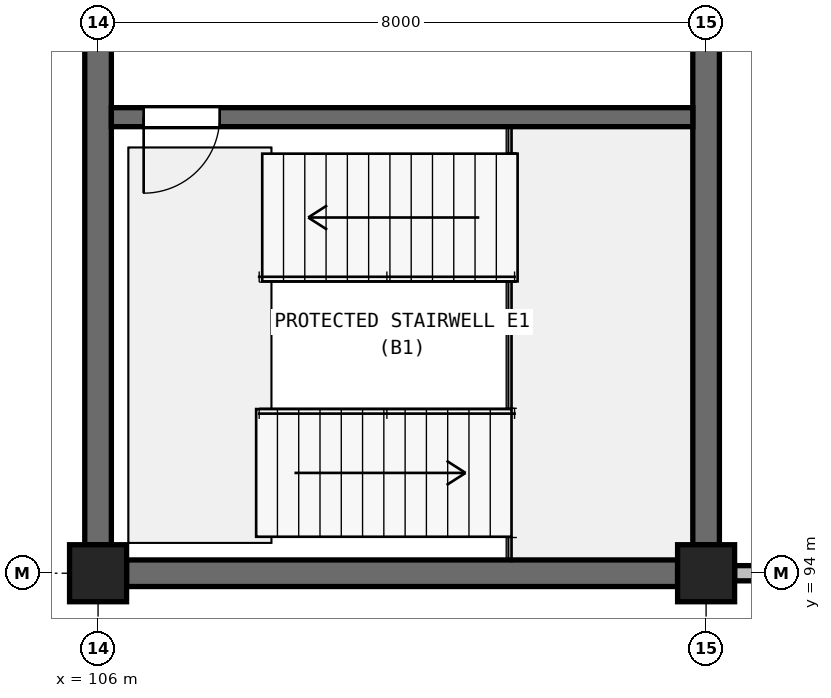
"""IFC4 building model, lengths in metres.
Left out: names, types, materials, properties, quantities, classifications, styles, units other than length and angle.
Written with IfcOpenShell. Run it as: python <this file> out.ifc"""

import sys

from ifc_helpers import new_model, si_unit, direction, frame, frame_2d, origin, origin_2d, place, context, subcontext, project, spatial, rectangle, extrude, element, fill, save


model = new_model("IFC4")
c1 = context("Model", 3, precision=1e-05, world=origin(), true_north=direction((0.0, 1.0)))
c2 = subcontext(c1, "Body", "Model", "MODEL_VIEW")
j1 = project(units=[si_unit("LENGTHUNIT", "METRE"), si_unit("PLANEANGLEUNIT", "RADIAN")], contexts=[c1])
p1 = place(None, origin())
s1 = spatial("IfcSite", under=j1, at=p1, CompositionType="ELEMENT")
p2 = place(p1, origin())
s2 = spatial("IfcBuilding", under=s1, at=p2, CompositionType="ELEMENT")
p3 = place(p2, frame((0.0, 0.0, -4.2)))
s3 = spatial("IfcBuildingStorey", under=s2, at=p3, CompositionType="ELEMENT", Elevation=-4.2)
for number, where, z_axis, x_axis in (
    (1, (106.0, 94.0, 0.0), (0.0, 0.0, 1.0), (1.0, 0.0, 0.0)),
    (2, (114.0, 94.0, 0.0), (0.0, 0.0, 1.0), (1.0, 0.0, 0.0)),
):
    element("IfcColumn", number, at=place(p3, frame(where, z_axis=z_axis, x_axis=x_axis)), inside=s3, PredefinedType="COLUMN", context=c2, shape_type="SweptSolid", body=[
        extrude(rectangle(XDim=0.75, YDim=0.75, at=origin_2d()), origin(), (0.0, 0.0, 1.0), 4.2),
    ])
p4 = place(p3, frame((98.394, 93.606, 0.0), z_axis=(0.0, 0.0, 1.0), x_axis=(0.707106781187, -0.707106781187, 0.0)))
e3 = element("IfcWall", 3, at=p4, inside=s3, PredefinedType="USERDEFINED", context=c2, shape_type="SweptSolid", body=[
    extrude(rectangle(XDim=10.2, YDim=0.4, at=frame_2d((5.1, 0.0))), origin(), (0.0, 0.0, 1.0), 3.92),
])
for number, where, z_axis, x_axis in (
    (4, (106.375, 94.0, 0.0), (0.0, 0.0, 1.0), (1.0, 0.0, 0.0)),
    (5, (106.0, 94.375, 0.0), (0.0, 0.0, 1.0), (0.0, 1.0, 0.0)),
    (6, (114.0, 94.375, 0.0), (0.0, 0.0, 1.0), (0.0, 1.0, 0.0)),
):
    element("IfcWall", number, at=place(p3, frame(where, z_axis=z_axis, x_axis=x_axis)), inside=s3, PredefinedType="SHEAR", context=c2, shape_type="SweptSolid", body=[
        extrude(rectangle(XDim=7.25, YDim=0.35, at=frame_2d((3.625, 0.0))), origin(), (0.0, 0.0, 1.0), 3.98),
    ])
p5 = place(p3, frame((106.175, 100.0, 0.0), z_axis=(0.0, 0.0, 1.0), x_axis=(1.0, 0.0, 0.0)))
e7 = element("IfcWall", 7, at=p5, inside=s3, PredefinedType="SOLIDWALL", context=c2, shape_type="SweptSolid", body=[
    extrude(rectangle(XDim=7.65, YDim=0.25, at=frame_2d((3.825, 0.0))), origin(), (0.0, 0.0, 1.0), 3.98),
])
p6 = place(p5, frame((0.425, 0.0, 0.0)))
e8 = element("IfcOpeningElement", 8, at=p6, cuts=e7, PredefinedType="OPENING", context=c2, shape_type="SweptSolid", body=[
    extrude(rectangle(XDim=1.0, YDim=2.2, at=frame_2d((0.5, 1.1))), frame((0.0, 0.135, 0.0), z_axis=(0.0, -1.0, 0.0), x_axis=(1.0, 0.0, 0.0)), (0.0, 0.0, 1.0), 0.27),
])
p7 = place(p3, frame((114.375, 94.0, 0.0), z_axis=(0.0, 0.0, 1.0), x_axis=(1.0, 0.0, 0.0)))
e9 = element("IfcWall", 9, at=p7, inside=s3, PredefinedType="PARTITIONING", context=c2, shape_type="SweptSolid", body=[
    extrude(rectangle(XDim=7.25, YDim=0.2, at=frame_2d((3.625, 0.0))), origin(), (0.0, 0.0, 1.0), 3.12),
])
p8 = place(p7, frame((2.54, 0.0, 0.0)))
e10 = element("IfcOpeningElement", 10, at=p8, cuts=e9, PredefinedType="OPENING", context=c2, shape_type="SweptSolid", body=[
    extrude(rectangle(XDim=1.8, YDim=2.2, at=frame_2d((0.9, 1.1))), frame((0.0, 0.11, 0.0), z_axis=(0.0, -1.0, 0.0), x_axis=(1.0, 0.0, 0.0)), (0.0, 0.0, 1.0), 0.22),
])
p9 = place(p6, frame((1.0, 0.0, 0.0), z_axis=(0.0, 0.0, 1.0), x_axis=(-1.0, 0.0, 0.0)))
e11 = element("IfcDoor", 11, at=p9, inside=s3, OperationType="SINGLE_SWING_LEFT", PredefinedType="DOOR", context=c2, shape_type="SweptSolid", body=[
    extrude(rectangle(XDim=1.0, YDim=2.2, at=frame_2d((0.5, 1.1))), frame((0.0, 0.025, 0.0), z_axis=(0.0, -1.0, 0.0), x_axis=(1.0, 0.0, 0.0)), (0.0, 0.0, 1.0), 0.05),
])
fill(e8, e11)
save(model, sys.argv[1])
